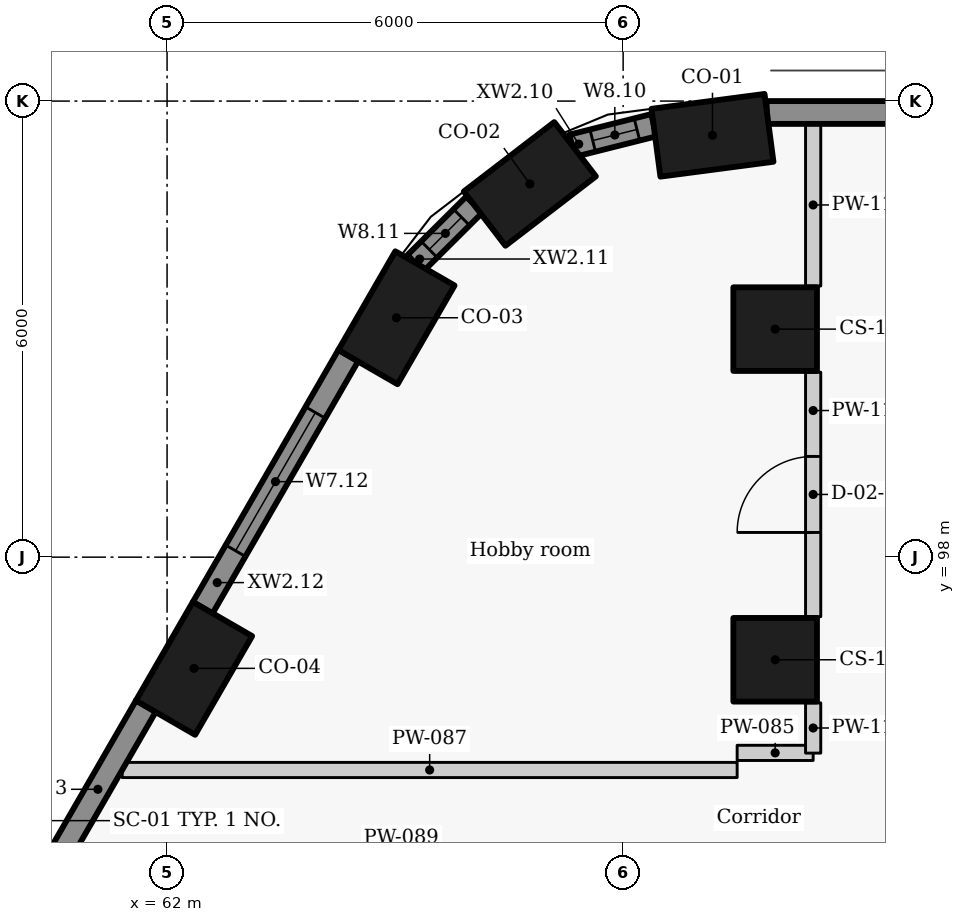
"""IFC4 building model, lengths in metres.
Left out: names, types, materials, properties, quantities, classifications, styles, units other than length and angle.
Written with IfcOpenShell. Run it as: python <this file> out.ifc"""

import sys

from ifc_helpers import new_model, si_unit, direction, frame, frame_2d, origin, origin_2d, place, context, subcontext, project, spatial, rectangle, extrude, element, fill, save


model = new_model("IFC4")
c1 = context("Model", 3, precision=1e-05, world=origin(), true_north=direction((0.0, 1.0)))
c2 = subcontext(c1, "Body", "Model", "MODEL_VIEW")
j1 = project(units=[si_unit("LENGTHUNIT", "METRE"), si_unit("PLANEANGLEUNIT", "RADIAN")], contexts=[c1])
p1 = place(None, origin())
s1 = spatial("IfcSite", under=j1, at=p1, CompositionType="ELEMENT")
p2 = place(p1, origin())
s2 = spatial("IfcBuilding", under=s1, at=p2, CompositionType="ELEMENT")
p3 = place(p2, frame((0.0, 0.0, 41.4)))
s3 = spatial("IfcBuildingStorey", under=s2, at=p3, CompositionType="ELEMENT", Elevation=41.4)
for number, where, z_axis, x_axis in (
    (1, (69.175, 103.55, 0.0), (0.0, 0.0, 1.0), (-0.991, -0.131, 0.0)),
    (2, (66.773, 102.91, 0.0), (0.0, 0.0, 1.0), (-0.793, -0.609, 0.0)),
    (3, (65.018, 101.149, 0.0), (0.0, 0.0, 1.0), (-0.5, -0.866, 0.0)),
    (4, (62.354, 96.537, 0.0), (0.0, 0.0, 1.0), (-0.5, -0.866, 0.0)),
):
    element("IfcColumn", number, at=place(p3, frame(where, z_axis=z_axis, x_axis=x_axis)), inside=s3, PredefinedType="COLUMN", context=c2, shape_type="SweptSolid", body=[
        extrude(rectangle(XDim=1.5, YDim=0.9, at=origin_2d()), origin(), (0.0, 0.0, 1.0), 3.3),
    ])
for number, where, z_axis, x_axis in (
    (5, (70.0, 101.0, 0.0), (0.0, 0.0, 1.0), (0.0, -1.0, 0.0)),
    (6, (70.0, 96.65, 0.0), (0.0, 0.0, 1.0), (0.0, -1.0, 0.0)),
):
    element("IfcColumn", number, at=place(p3, frame(where, z_axis=z_axis, x_axis=x_axis)), inside=s3, PredefinedType="COLUMN", context=c2, shape_type="SweptSolid", body=[
        extrude(rectangle(XDim=1.1, YDim=1.1, at=origin_2d()), origin(), (0.0, 0.0, 1.0), 3.3),
    ])
p4 = place(p3, frame((90.079, 103.85, 0.0), z_axis=(0.0, 0.0, 1.0), x_axis=(-1.0, 0.0, 0.0)))
e7 = element("IfcWall", 7, at=p4, inside=s3, PredefinedType="SOLIDWALL", context=c2, shape_type="SweptSolid", body=[
    extrude(rectangle(XDim=20.19, YDim=0.3, at=frame_2d((10.095, 0.0))), origin(), (0.0, 0.0, 1.0), 2.425),
])
p5 = place(p3, frame((68.405, 103.683, 0.0), z_axis=(0.0, 0.0, 1.0), x_axis=(-0.969766298956, -0.244035500304, 0.0)))
e8 = element("IfcWall", 8, at=p5, inside=s3, PredefinedType="SOLIDWALL", context=c2, shape_type="SweptSolid", body=[
    extrude(rectangle(XDim=1.111, YDim=0.3, at=frame_2d((0.555, 0.0))), origin(), (0.0, 0.0, 1.0), 2.425),
])
p6 = place(p5, frame((0.231, 0.0, 0.9)))
e9 = element("IfcOpeningElement", 9, at=p6, cuts=e8, PredefinedType="OPENING", context=c2, shape_type="SweptSolid", body=[
    extrude(rectangle(XDim=0.6, YDim=1.1, at=frame_2d((0.3, 0.55))), frame((0.0, 0.16, 0.0), z_axis=(0.0, -1.0, 0.0), x_axis=(1.0, 0.0, 0.0)), (0.0, 0.0, 1.0), 0.32),
])
p7 = place(p3, frame((66.042, 102.637, 0.0), z_axis=(0.0, 0.0, 1.0), x_axis=(-0.708892395813, -0.705316646024, 0.0)))
e10 = element("IfcWall", 10, at=p7, inside=s3, PredefinedType="SOLIDWALL", context=c2, shape_type="SweptSolid", body=[
    extrude(rectangle(XDim=1.093, YDim=0.3, at=frame_2d((0.546, 0.0))), origin(), (0.0, 0.0, 1.0), 2.425),
])
p8 = place(p7, frame((0.236, 0.0, 0.9)))
e11 = element("IfcOpeningElement", 11, at=p8, cuts=e10, PredefinedType="OPENING", context=c2, shape_type="SweptSolid", body=[
    extrude(rectangle(XDim=0.6, YDim=1.1, at=frame_2d((0.3, 0.55))), frame((0.0, 0.16, 0.0), z_axis=(0.0, -1.0, 0.0), x_axis=(1.0, 0.0, 0.0)), (0.0, 0.0, 1.0), 0.32),
])
p9 = place(p3, frame((64.385, 100.654, 0.0), z_axis=(0.0, 0.0, 1.0), x_axis=(-0.499974163209, -0.866040320149, 0.0)))
e12 = element("IfcWall", 12, at=p9, inside=s3, PredefinedType="SOLIDWALL", context=c2, shape_type="SweptSolid", body=[
    extrude(rectangle(XDim=3.834, YDim=0.3, at=frame_2d((1.917, 0.0))), origin(), (0.0, 0.0, 1.0), 2.425),
])
p10 = place(p9, frame((0.867, 0.0, 0.9)))
e13 = element("IfcOpeningElement", 13, at=p10, cuts=e12, PredefinedType="OPENING", context=c2, shape_type="SweptSolid", body=[
    extrude(rectangle(XDim=2.1, YDim=1.1, at=frame_2d((1.05, 0.55))), frame((0.0, 0.16, 0.0), z_axis=(0.0, -1.0, 0.0), x_axis=(1.0, 0.0, 0.0)), (0.0, 0.0, 1.0), 0.32),
])
p11 = place(p3, frame((61.722, 96.041, 0.0), z_axis=(0.0, 0.0, 1.0), x_axis=(-0.500001735503, -0.866024401789, 0.0)))
e14 = element("IfcWall", 14, at=p11, inside=s3, PredefinedType="SOLIDWALL", context=c2, shape_type="SweptSolid", body=[
    extrude(rectangle(XDim=3.834, YDim=0.3, at=frame_2d((1.917, 0.0))), origin(), (0.0, 0.0, 1.0), 2.425),
])
p12 = place(p11, frame((2.629, 0.0, 0.9)))
e15 = element("IfcOpeningElement", 15, at=p12, cuts=e14, PredefinedType="OPENING", context=c2, shape_type="SweptSolid", body=[
    extrude(rectangle(XDim=0.9, YDim=1.1, at=frame_2d((0.45, 0.55))), frame((0.0, 0.16, 0.0), z_axis=(0.0, -1.0, 0.0), x_axis=(1.0, 0.0, 0.0)), (0.0, 0.0, 1.0), 0.32),
])
p13 = place(p3, frame((69.5, 95.425, 0.0), z_axis=(0.0, 0.0, 1.0), x_axis=(1.0, 0.0, 0.0)))
e16 = element("IfcWall", 16, at=p13, inside=s3, PredefinedType="PARTITIONING", context=c2, shape_type="SweptSolid", body=[
    extrude(rectangle(XDim=1.0, YDim=0.2, at=frame_2d((0.5, 0.0))), origin(), (0.0, 0.0, 1.0), 2.505),
])
p14 = place(p3, frame((61.409, 95.2, 0.0), z_axis=(0.0, 0.0, 1.0), x_axis=(1.0, 0.0, 0.0)))
e17 = element("IfcWall", 17, at=p14, inside=s3, PredefinedType="PARTITIONING", context=c2, shape_type="SweptSolid", body=[
    extrude(rectangle(XDim=8.091, YDim=0.2, at=frame_2d((4.045, 0.0))), origin(), (0.0, 0.0, 1.0), 2.405),
])
p15 = place(p3, frame((70.5, 95.422, 0.0), z_axis=(0.0, 0.0, 1.0), x_axis=(0.0, 1.0, 0.0)))
e18 = element("IfcWall", 18, at=p15, inside=s3, PredefinedType="PARTITIONING", context=c2, shape_type="SweptSolid", body=[
    extrude(rectangle(XDim=0.661, YDim=0.2, at=frame_2d((0.331, 0.0))), origin(), (0.0, 0.0, 1.0), 3.025),
])
p16 = place(p3, frame((70.5, 97.217, 0.0), z_axis=(0.0, 0.0, 1.0), x_axis=(0.0, 1.0, 0.0)))
e19 = element("IfcWall", 19, at=p16, inside=s3, PredefinedType="PARTITIONING", context=c2, shape_type="SweptSolid", body=[
    extrude(rectangle(XDim=3.216, YDim=0.2, at=frame_2d((1.608, 0.0))), origin(), (0.0, 0.0, 1.0), 3.025),
])
p17 = place(p16, frame((1.108, 0.0, 0.0)))
e20 = element("IfcOpeningElement", 20, at=p17, cuts=e19, PredefinedType="OPENING", context=c2, shape_type="SweptSolid", body=[
    extrude(rectangle(XDim=1.0, YDim=2.1, at=frame_2d((0.5, 1.05))), frame((0.0, 0.11, 0.0), z_axis=(0.0, -1.0, 0.0), x_axis=(1.0, 0.0, 0.0)), (0.0, 0.0, 1.0), 0.22),
])
p18 = place(p3, frame((70.5, 101.567, 0.0), z_axis=(0.0, 0.0, 1.0), x_axis=(0.0, 1.0, 0.0)))
e21 = element("IfcWall", 21, at=p18, inside=s3, PredefinedType="PARTITIONING", context=c2, shape_type="SweptSolid", body=[
    extrude(rectangle(XDim=2.133, YDim=0.2, at=frame_2d((1.066, 0.0))), origin(), (0.0, 0.0, 1.0), 3.025),
])
p19 = place(p6, origin())
e22 = element("IfcWindow", 22, at=p19, inside=s3, PartitioningType="SINGLE_PANEL", PredefinedType="WINDOW", context=c2, shape_type="SweptSolid", body=[
    extrude(rectangle(XDim=0.6, YDim=1.1, at=frame_2d((0.3, 0.55))), frame((0.0, 0.03, 0.0), z_axis=(0.0, -1.0, 0.0), x_axis=(1.0, 0.0, 0.0)), (0.0, 0.0, 1.0), 0.06),
])
fill(e9, e22)
p20 = place(p8, origin())
e23 = element("IfcWindow", 23, at=p20, inside=s3, PartitioningType="SINGLE_PANEL", PredefinedType="WINDOW", context=c2, shape_type="SweptSolid", body=[
    extrude(rectangle(XDim=0.6, YDim=1.1, at=frame_2d((0.3, 0.55))), frame((0.0, 0.03, 0.0), z_axis=(0.0, -1.0, 0.0), x_axis=(1.0, 0.0, 0.0)), (0.0, 0.0, 1.0), 0.06),
])
fill(e11, e23)
p21 = place(p10, origin())
e24 = element("IfcWindow", 24, at=p21, inside=s3, PartitioningType="SINGLE_PANEL", PredefinedType="WINDOW", context=c2, shape_type="SweptSolid", body=[
    extrude(rectangle(XDim=2.1, YDim=1.1, at=frame_2d((1.05, 0.55))), frame((0.0, 0.03, 0.0), z_axis=(0.0, -1.0, 0.0), x_axis=(1.0, 0.0, 0.0)), (0.0, 0.0, 1.0), 0.06),
])
fill(e13, e24)
p22 = place(p17, origin())
e25 = element("IfcDoor", 25, at=p22, inside=s3, OperationType="SINGLE_SWING_LEFT", PredefinedType="DOOR", context=c2, shape_type="SweptSolid", body=[
    extrude(rectangle(XDim=1.0, YDim=2.1, at=frame_2d((0.5, 1.05))), frame((0.0, 0.025, 0.0), z_axis=(0.0, -1.0, 0.0), x_axis=(1.0, 0.0, 0.0)), (0.0, 0.0, 1.0), 0.05),
])
fill(e20, e25)
save(model, sys.argv[1])
